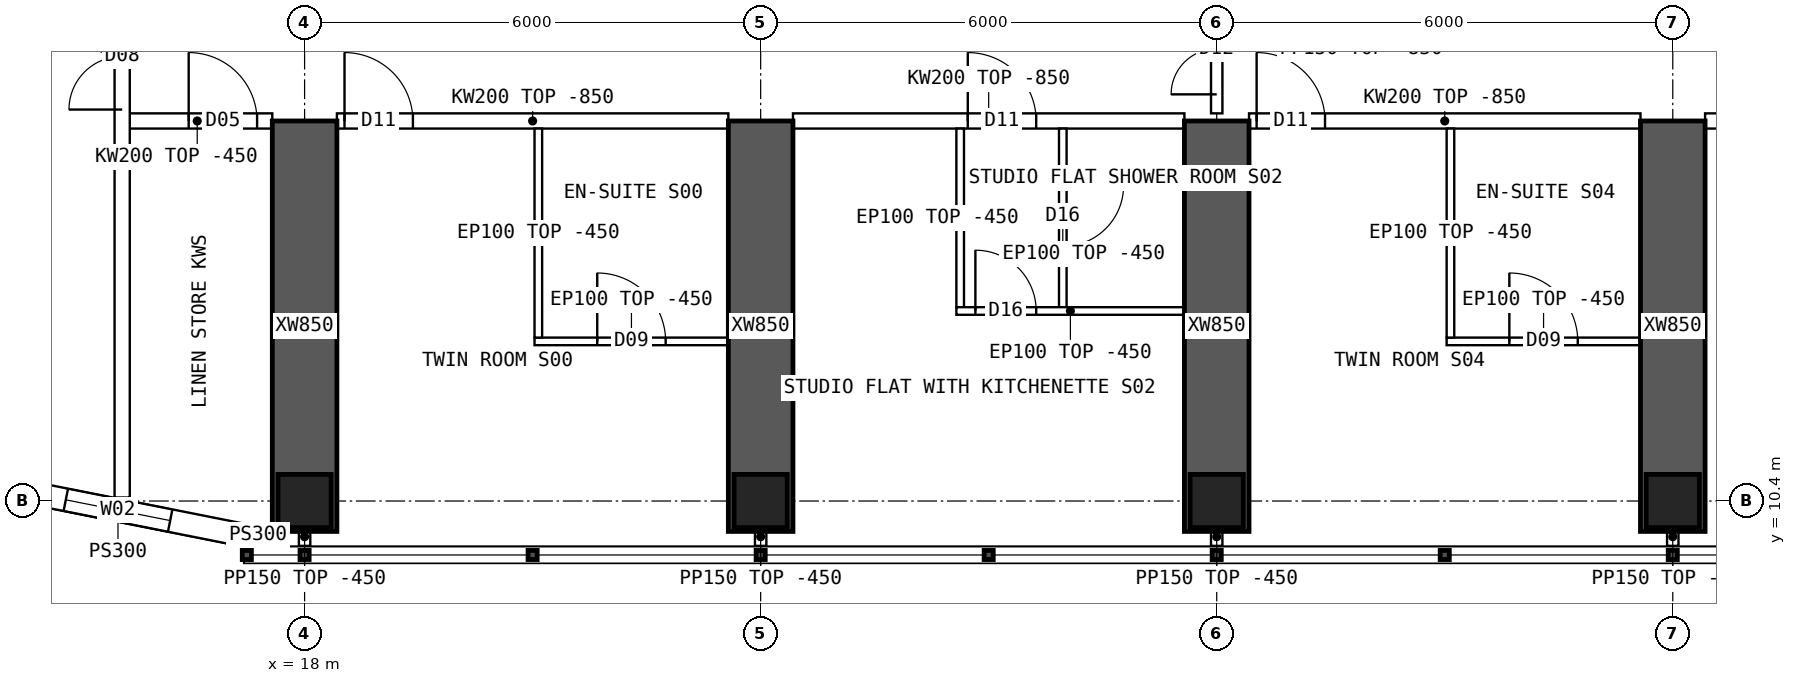
"""IFC4 building model, lengths in metres.
Left out: names, types, materials, properties, quantities, classifications, styles, units other than length and angle.
Written with IfcOpenShell. Run it as: python <this file> out.ifc"""

import sys

from ifc_helpers import new_model, si_unit, direction, frame, frame_2d, origin, origin_2d, place, context, subcontext, project, spatial, polyline, rectangle, hollow_rectangle, outline, extrude, element, fill, save


model = new_model("IFC4")
c1 = context("Model", 3, precision=1e-05, world=origin(), true_north=direction((0.0, 1.0)))
c2 = subcontext(c1, "Body", "Model", "MODEL_VIEW")
j1 = project(units=[si_unit("LENGTHUNIT", "METRE"), si_unit("PLANEANGLEUNIT", "RADIAN")], contexts=[c1])
p1 = place(None, origin())
s1 = spatial("IfcSite", under=j1, at=p1, CompositionType="ELEMENT")
p2 = place(p1, origin())
s2 = spatial("IfcBuilding", under=s1, at=p2, CompositionType="ELEMENT")
p3 = place(p2, frame((0.0, 0.0, 174.85)))
s3 = spatial("IfcBuildingStorey", under=s2, at=p3, CompositionType="ELEMENT", Elevation=174.85)
for number, where, z_axis, x_axis in (
    (1, (18.0, 10.4, 0.0), (0.0, 0.0, 1.0), (1.0, 0.0, 0.0)),
    (2, (24.0, 10.4, 0.0), (0.0, 0.0, 1.0), (1.0, 0.0, 0.0)),
    (3, (30.0, 10.4, 0.0), (0.0, 0.0, 1.0), (1.0, 0.0, 0.0)),
    (4, (36.0, 10.4, 0.0), (0.0, 0.0, 1.0), (1.0, 0.0, 0.0)),
):
    element("IfcColumn", number, at=place(p3, frame(where, z_axis=z_axis, x_axis=x_axis)), inside=s3, PredefinedType="COLUMN", context=c2, shape_type="SweptSolid", body=[
        extrude(hollow_rectangle(XDim=0.7, YDim=0.7, WallThickness=0.07, at=origin_2d()), origin(), (0.0, 0.0, 1.0), 3.75),
    ])
for number, where, z_axis, x_axis in (
    (5, (18.0, 10.0, 0.0), (0.0, 0.0, 1.0), (0.0, 1.0, 0.0)),
    (6, (24.0, 10.0, 0.0), (0.0, 0.0, 1.0), (0.0, 1.0, 0.0)),
    (7, (30.0, 10.0, 0.0), (0.0, 0.0, 1.0), (0.0, 1.0, 0.0)),
    (8, (36.0, 10.0, 0.0), (0.0, 0.0, 1.0), (0.0, 1.0, 0.0)),
):
    element("IfcWall", number, at=place(p3, frame(where, z_axis=z_axis, x_axis=x_axis)), inside=s3, PredefinedType="SHEAR", context=c2, shape_type="SweptSolid", body=[
        extrude(rectangle(XDim=5.4, YDim=0.85, at=frame_2d((2.7, 0.0))), origin(), (0.0, 0.0, 1.0), 3.75),
    ])
p4 = place(p3, frame((13.89, 10.608, 0.0), z_axis=(0.0, 0.0, 1.0), x_axis=(0.98078325777, -0.195100490205, 0.0)))
e9 = element("IfcWall", 9, at=p4, inside=s3, PredefinedType="SOLIDWALL", context=c2, shape_type="SweptSolid", body=[
    extrude(outline(polyline([(-0.03, -0.15), (3.405, -0.15), (3.345, 0.15), (0.03, 0.15), (-0.03, -0.15)])), origin(), (0.0, 0.0, 1.0), 3.3),
])
p5 = place(p4, frame((0.988, 0.0, 0.9)))
e10 = element("IfcOpeningElement", 10, at=p5, cuts=e9, PredefinedType="OPENING", context=c2, shape_type="SweptSolid", body=[
    extrude(rectangle(XDim=1.4, YDim=1.8, at=frame_2d((0.7, 0.9))), frame((0.0, 0.16, 0.0), z_axis=(0.0, -1.0, 0.0), x_axis=(1.0, 0.0, 0.0)), (0.0, 0.0, 1.0), 0.32),
])
p6 = place(p3, frame((17.2, 9.95, 0.0), z_axis=(0.0, 0.0, 1.0), x_axis=(1.0, 0.0, 0.0)))
e11 = element("IfcWall", 11, at=p6, inside=s3, PredefinedType="SOLIDWALL", context=c2, shape_type="SweptSolid", body=[
    extrude(rectangle(XDim=0.375, YDim=0.3, at=frame_2d((0.188, 0.0))), origin(), (0.0, 0.0, 1.0), 3.3),
])
p7 = place(p3, frame((15.6, 15.4, 0.0), z_axis=(0.0, 0.0, 1.0), x_axis=(1.0, 0.0, 0.0)))
e12 = element("IfcWall", 12, at=p7, inside=s3, PredefinedType="SOLIDWALL", context=c2, shape_type="SweptSolid", body=[
    extrude(rectangle(XDim=1.975, YDim=0.2, at=frame_2d((0.987, 0.0))), origin(), (0.0, 0.0, 1.0), 3.3),
])
p8 = place(p7, frame((0.875, 0.0, 0.0)))
e13 = element("IfcOpeningElement", 13, at=p8, cuts=e12, PredefinedType="OPENING", context=c2, shape_type="SweptSolid", body=[
    extrude(rectangle(XDim=0.9, YDim=2.1, at=frame_2d((0.45, 1.05))), frame((0.0, 0.11, 0.0), z_axis=(0.0, -1.0, 0.0), x_axis=(1.0, 0.0, 0.0)), (0.0, 0.0, 1.0), 0.22),
])
p9 = place(p3, frame((18.425, 15.4, 0.0), z_axis=(0.0, 0.0, 1.0), x_axis=(1.0, 0.0, 0.0)))
e14 = element("IfcWall", 14, at=p9, inside=s3, PredefinedType="SOLIDWALL", context=c2, shape_type="SweptSolid", body=[
    extrude(outline(polyline([(0.0, 0.0), (5.15, 0.0), (5.15, 2.9), (0.0, 2.9), (0.0, 0.0)])), frame((0.0, 0.1, 0.0), z_axis=(0.0, -1.0, 0.0), x_axis=(1.0, 0.0, 0.0)), (0.0, 0.0, 1.0), 0.2),
])
p10 = place(p9, frame((0.1, 0.0, 0.0)))
e15 = element("IfcOpeningElement", 15, at=p10, cuts=e14, PredefinedType="OPENING", context=c2, shape_type="SweptSolid", body=[
    extrude(rectangle(XDim=0.9, YDim=2.1, at=frame_2d((0.45, 1.05))), frame((0.0, 0.11, 0.0), z_axis=(0.0, -1.0, 0.0), x_axis=(1.0, 0.0, 0.0)), (0.0, 0.0, 1.0), 0.22),
])
p11 = place(p3, frame((24.425, 15.4, 0.0), z_axis=(0.0, 0.0, 1.0), x_axis=(1.0, 0.0, 0.0)))
e16 = element("IfcWall", 16, at=p11, inside=s3, PredefinedType="SOLIDWALL", context=c2, shape_type="SweptSolid", body=[
    extrude(outline(polyline([(0.0, 0.0), (5.15, 0.0), (5.15, 2.9), (0.0, 2.9), (0.0, 0.0)])), frame((0.0, 0.1, 0.0), z_axis=(0.0, -1.0, 0.0), x_axis=(1.0, 0.0, 0.0)), (0.0, 0.0, 1.0), 0.2),
])
p12 = place(p11, frame((2.3, 0.0, 0.0)))
e17 = element("IfcOpeningElement", 17, at=p12, cuts=e16, PredefinedType="OPENING", context=c2, shape_type="SweptSolid", body=[
    extrude(rectangle(XDim=0.9, YDim=2.1, at=frame_2d((0.45, 1.05))), frame((0.0, 0.11, 0.0), z_axis=(0.0, -1.0, 0.0), x_axis=(1.0, 0.0, 0.0)), (0.0, 0.0, 1.0), 0.22),
])
p13 = place(p3, frame((30.425, 15.4, 0.0), z_axis=(0.0, 0.0, 1.0), x_axis=(1.0, 0.0, 0.0)))
e18 = element("IfcWall", 18, at=p13, inside=s3, PredefinedType="SOLIDWALL", context=c2, shape_type="SweptSolid", body=[
    extrude(outline(polyline([(0.0, 0.0), (5.15, 0.0), (5.15, 2.9), (0.0, 2.9), (0.0, 0.0)])), frame((0.0, 0.1, 0.0), z_axis=(0.0, -1.0, 0.0), x_axis=(1.0, 0.0, 0.0)), (0.0, 0.0, 1.0), 0.2),
])
p14 = place(p13, frame((0.1, 0.0, 0.0)))
e19 = element("IfcOpeningElement", 19, at=p14, cuts=e18, PredefinedType="OPENING", context=c2, shape_type="SweptSolid", body=[
    extrude(rectangle(XDim=0.9, YDim=2.1, at=frame_2d((0.45, 1.05))), frame((0.0, 0.11, 0.0), z_axis=(0.0, -1.0, 0.0), x_axis=(1.0, 0.0, 0.0)), (0.0, 0.0, 1.0), 0.22),
])
p15 = place(p3, frame((36.425, 15.4, 0.0), z_axis=(0.0, 0.0, 1.0), x_axis=(1.0, 0.0, 0.0)))
e20 = element("IfcWall", 20, at=p15, inside=s3, PredefinedType="SOLIDWALL", context=c2, shape_type="SweptSolid", body=[
    extrude(outline(polyline([(0.0, 0.0), (5.15, 0.0), (5.15, 2.9), (0.0, 2.9), (0.0, 0.0)])), frame((0.0, 0.1, 0.0), z_axis=(0.0, -1.0, 0.0), x_axis=(1.0, 0.0, 0.0)), (0.0, 0.0, 1.0), 0.2),
])
p16 = place(p15, frame((0.3, 0.0, 0.0)))
e21 = element("IfcOpeningElement", 21, at=p16, cuts=e20, PredefinedType="OPENING", context=c2, shape_type="SweptSolid", body=[
    extrude(rectangle(XDim=1.0, YDim=2.1, at=frame_2d((0.5, 1.05))), frame((0.0, 0.11, 0.0), z_axis=(0.0, -1.0, 0.0), x_axis=(1.0, 0.0, 0.0)), (0.0, 0.0, 1.0), 0.22),
])
p17 = place(p3, frame((23.575, 12.5, 0.0), z_axis=(0.0, 0.0, 1.0), x_axis=(-1.0, 0.0, 0.0)))
e22 = element("IfcWall", 22, at=p17, inside=s3, PredefinedType="PARTITIONING", context=c2, shape_type="SweptSolid", body=[
    extrude(rectangle(XDim=2.55, YDim=0.1, at=frame_2d((1.275, 0.0))), origin(), (0.0, 0.0, 1.0), 3.3),
])
p18 = place(p17, frame((0.825, 0.0, 0.0)))
e23 = element("IfcOpeningElement", 23, at=p18, cuts=e22, PredefinedType="OPENING", context=c2, shape_type="SweptSolid", body=[
    extrude(rectangle(XDim=0.9, YDim=2.1, at=frame_2d((0.45, 1.05))), frame((0.0, 0.06, 0.0), z_axis=(0.0, -1.0, 0.0), x_axis=(1.0, 0.0, 0.0)), (0.0, 0.0, 1.0), 0.12),
])
p19 = place(p3, frame((21.075, 12.55, 0.0), z_axis=(0.0, 0.0, 1.0), x_axis=(0.0, 1.0, 0.0)))
e24 = element("IfcWall", 24, at=p19, inside=s3, PredefinedType="PARTITIONING", context=c2, shape_type="SweptSolid", body=[
    extrude(outline(polyline([(0.0, 0.0), (2.75, 0.0), (2.75, 2.9), (2.702, 2.9), (2.7, 3.3), (0.0, 3.3), (0.0, 0.0)])), frame((0.0, 0.05, 0.0), z_axis=(0.0, -1.0, 0.0), x_axis=(1.0, 0.0, 0.0)), (0.0, 0.0, 1.0), 0.1),
])
p20 = place(p3, frame((29.575, 12.9, 0.0), z_axis=(0.0, 0.0, 1.0), x_axis=(-1.0, 0.0, 0.0)))
e25 = element("IfcWall", 25, at=p20, inside=s3, PredefinedType="PARTITIONING", context=c2, shape_type="SweptSolid", body=[
    extrude(rectangle(XDim=3.0, YDim=0.1, at=frame_2d((1.5, 0.0))), origin(), (0.0, 0.0, 1.0), 3.3),
])
p21 = place(p20, frame((1.95, 0.0, 0.0)))
e26 = element("IfcOpeningElement", 26, at=p21, cuts=e25, PredefinedType="OPENING", context=c2, shape_type="SweptSolid", body=[
    extrude(rectangle(XDim=0.8, YDim=2.1, at=frame_2d((0.4, 1.05))), frame((0.0, 0.06, 0.0), z_axis=(0.0, -1.0, 0.0), x_axis=(1.0, 0.0, 0.0)), (0.0, 0.0, 1.0), 0.12),
])
p22 = place(p3, frame((26.625, 12.95, 0.0), z_axis=(0.0, 0.0, 1.0), x_axis=(0.0, 1.0, 0.0)))
e27 = element("IfcWall", 27, at=p22, inside=s3, PredefinedType="PARTITIONING", context=c2, shape_type="SweptSolid", body=[
    extrude(outline(polyline([(0.0, 0.0), (2.35, 0.0), (2.35, 2.9), (2.302, 2.9), (2.3, 3.3), (0.0, 3.3), (0.0, 0.0)])), frame((0.0, 0.05, 0.0), z_axis=(0.0, -1.0, 0.0), x_axis=(1.0, 0.0, 0.0)), (0.0, 0.0, 1.0), 0.1),
])
p23 = place(p3, frame((27.975, 12.95, 0.0), z_axis=(0.0, 0.0, 1.0), x_axis=(0.0, 1.0, 0.0)))
e28 = element("IfcWall", 28, at=p23, inside=s3, PredefinedType="PARTITIONING", context=c2, shape_type="SweptSolid", body=[
    extrude(outline(polyline([(0.0, 0.0), (2.35, 0.0), (2.35, 2.9), (2.302, 2.9), (2.3, 3.3), (0.0, 3.3), (0.0, 0.0)])), frame((0.0, 0.05, 0.0), z_axis=(0.0, -1.0, 0.0), x_axis=(1.0, 0.0, 0.0)), (0.0, 0.0, 1.0), 0.1),
])
p24 = place(p23, frame((0.8, 0.0, 0.0)))
e29 = element("IfcOpeningElement", 29, at=p24, cuts=e28, PredefinedType="OPENING", context=c2, shape_type="SweptSolid", body=[
    extrude(rectangle(XDim=0.8, YDim=2.1, at=frame_2d((0.4, 1.05))), frame((0.0, 0.06, 0.0), z_axis=(0.0, -1.0, 0.0), x_axis=(1.0, 0.0, 0.0)), (0.0, 0.0, 1.0), 0.12),
])
p25 = place(p3, frame((35.575, 12.5, 0.0), z_axis=(0.0, 0.0, 1.0), x_axis=(-1.0, 0.0, 0.0)))
e30 = element("IfcWall", 30, at=p25, inside=s3, PredefinedType="PARTITIONING", context=c2, shape_type="SweptSolid", body=[
    extrude(rectangle(XDim=2.55, YDim=0.1, at=frame_2d((1.275, 0.0))), origin(), (0.0, 0.0, 1.0), 3.3),
])
p26 = place(p25, frame((0.825, 0.0, 0.0)))
e31 = element("IfcOpeningElement", 31, at=p26, cuts=e30, PredefinedType="OPENING", context=c2, shape_type="SweptSolid", body=[
    extrude(rectangle(XDim=0.9, YDim=2.1, at=frame_2d((0.45, 1.05))), frame((0.0, 0.06, 0.0), z_axis=(0.0, -1.0, 0.0), x_axis=(1.0, 0.0, 0.0)), (0.0, 0.0, 1.0), 0.12),
])
p27 = place(p3, frame((33.075, 12.55, 0.0), z_axis=(0.0, 0.0, 1.0), x_axis=(0.0, 1.0, 0.0)))
e32 = element("IfcWall", 32, at=p27, inside=s3, PredefinedType="PARTITIONING", context=c2, shape_type="SweptSolid", body=[
    extrude(outline(polyline([(0.0, 0.0), (2.75, 0.0), (2.75, 2.9), (2.702, 2.9), (2.7, 3.3), (0.0, 3.3), (0.0, 0.0)])), frame((0.0, 0.05, 0.0), z_axis=(0.0, -1.0, 0.0), x_axis=(1.0, 0.0, 0.0)), (0.0, 0.0, 1.0), 0.1),
])
p28 = place(p3, frame((30.0, 15.5, 0.0), z_axis=(0.0, 0.0, 1.0), x_axis=(0.0, 1.0, 0.0)))
e33 = element("IfcWall", 33, at=p28, inside=s3, PredefinedType="PARTITIONING", context=c2, shape_type="SweptSolid", body=[
    extrude(outline(polyline([(0.0, 0.0), (1.7, 0.0), (1.7, 2.9), (0.0, 2.9), (0.0, 0.0)])), frame((0.0, 0.075, 0.0), z_axis=(0.0, -1.0, 0.0), x_axis=(1.0, 0.0, 0.0)), (0.0, 0.0, 1.0), 0.15),
])
p29 = place(p28, frame((0.25, 0.0, 0.0)))
e34 = element("IfcOpeningElement", 34, at=p29, cuts=e33, PredefinedType="OPENING", context=c2, shape_type="SweptSolid", body=[
    extrude(rectangle(XDim=1.2, YDim=2.1, at=frame_2d((0.6, 1.05))), frame((0.0, 0.085, 0.0), z_axis=(0.0, -1.0, 0.0), x_axis=(1.0, 0.0, 0.0)), (0.0, 0.0, 1.0), 0.17),
])
p30 = place(p3, frame((15.6, 10.446, 0.0), z_axis=(0.0, 0.0, 1.0), x_axis=(0.0, 1.0, 0.0)))
e35 = element("IfcWall", 35, at=p30, inside=s3, PredefinedType="SOLIDWALL", context=c2, shape_type="SweptSolid", body=[
    extrude(rectangle(XDim=43.107, YDim=0.2, at=frame_2d((21.554, 0.0))), origin(), (0.0, 0.0, 1.0), 3.3),
])
p31 = place(p30, frame((13.914, 0.0, 0.0)))
e36 = element("IfcOpeningElement", 36, at=p31, cuts=e35, PredefinedType="OPENING", context=c2, shape_type="SweptSolid", body=[
    extrude(rectangle(XDim=1.2, YDim=2.1, at=frame_2d((0.6, 1.05))), frame((0.0, 0.11, 0.0), z_axis=(0.0, -1.0, 0.0), x_axis=(1.0, 0.0, 0.0)), (0.0, 0.0, 1.0), 0.22),
])
p32 = place(p30, frame((27.994, 0.0, 0.0)))
e37 = element("IfcOpeningElement", 37, at=p32, cuts=e35, PredefinedType="OPENING", context=c2, shape_type="SweptSolid", body=[
    extrude(rectangle(XDim=1.2, YDim=2.1, at=frame_2d((0.6, 1.05))), frame((0.0, 0.11, 0.0), z_axis=(0.0, -1.0, 0.0), x_axis=(1.0, 0.0, 0.0)), (0.0, 0.0, 1.0), 0.22),
])
p33 = place(p30, frame((5.104, 0.0, 0.0)))
e38 = element("IfcOpeningElement", 38, at=p33, cuts=e35, PredefinedType="OPENING", context=c2, shape_type="SweptSolid", body=[
    extrude(rectangle(XDim=1.4, YDim=2.1, at=frame_2d((0.7, 1.05))), frame((0.0, 0.11, 0.0), z_axis=(0.0, -1.0, 0.0), x_axis=(1.0, 0.0, 0.0)), (0.0, 0.0, 1.0), 0.22),
])
p34 = place(p30, frame((36.504, 0.0, 0.0)))
e39 = element("IfcOpeningElement", 39, at=p34, cuts=e35, PredefinedType="OPENING", context=c2, shape_type="SweptSolid", body=[
    extrude(rectangle(XDim=1.4, YDim=2.1, at=frame_2d((0.7, 1.05))), frame((0.0, 0.11, 0.0), z_axis=(0.0, -1.0, 0.0), x_axis=(1.0, 0.0, 0.0)), (0.0, 0.0, 1.0), 0.22),
])
for number, where, z_axis, x_axis in (
    (40, (18.0, 10.05, 0.0), (0.0, 0.0, 1.0), (0.0, -1.0, 0.0)),
    (41, (24.0, 10.05, 0.0), (0.0, 0.0, 1.0), (0.0, -1.0, 0.0)),
    (42, (30.0, 10.05, 0.0), (0.0, 0.0, 1.0), (0.0, -1.0, 0.0)),
    (43, (36.0, 10.05, 0.0), (0.0, 0.0, 1.0), (0.0, -1.0, 0.0)),
):
    element("IfcWall", number, at=place(p3, frame(where, z_axis=z_axis, x_axis=x_axis)), inside=s3, PredefinedType="PARTITIONING", context=c2, shape_type="SweptSolid", body=[
        extrude(rectangle(XDim=0.24, YDim=0.15, at=frame_2d((0.12, 0.0))), origin(), (0.0, 0.0, 1.0), 3.3),
    ])
p35 = place(p5, origin())
e44 = element("IfcWindow", 44, at=p35, inside=s3, PartitioningType="SINGLE_PANEL", PredefinedType="WINDOW", context=c2, shape_type="SweptSolid", body=[
    extrude(rectangle(XDim=1.4, YDim=1.8, at=frame_2d((0.7, 0.9))), frame((0.0, 0.03, 0.0), z_axis=(0.0, -1.0, 0.0), x_axis=(1.0, 0.0, 0.0)), (0.0, 0.0, 1.0), 0.06),
])
fill(e10, e44)
p36 = place(p18, origin())
e45 = element("IfcDoor", 45, at=p36, inside=s3, OperationType="SINGLE_SWING_RIGHT", PredefinedType="DOOR", context=c2, shape_type="SweptSolid", body=[
    extrude(rectangle(XDim=0.9, YDim=2.1, at=frame_2d((0.45, 1.05))), frame((0.0, 0.025, 0.0), z_axis=(0.0, -1.0, 0.0), x_axis=(1.0, 0.0, 0.0)), (0.0, 0.0, 1.0), 0.05),
])
fill(e23, e45)
p37 = place(p10, origin())
e46 = element("IfcDoor", 46, at=p37, inside=s3, OperationType="SINGLE_SWING_LEFT", PredefinedType="DOOR", context=c2, shape_type="SweptSolid", body=[
    extrude(rectangle(XDim=0.9, YDim=2.1, at=frame_2d((0.45, 1.05))), frame((0.0, 0.025, 0.0), z_axis=(0.0, -1.0, 0.0), x_axis=(1.0, 0.0, 0.0)), (0.0, 0.0, 1.0), 0.05),
])
fill(e15, e46)
p38 = place(p21, origin())
e47 = element("IfcDoor", 47, at=p38, inside=s3, OperationType="SINGLE_SWING_RIGHT", PredefinedType="DOOR", context=c2, shape_type="SweptSolid", body=[
    extrude(rectangle(XDim=0.8, YDim=2.1, at=frame_2d((0.4, 1.05))), frame((0.0, 0.025, 0.0), z_axis=(0.0, -1.0, 0.0), x_axis=(1.0, 0.0, 0.0)), (0.0, 0.0, 1.0), 0.05),
])
fill(e26, e47)
p39 = place(p24, origin())
e48 = element("IfcDoor", 48, at=p39, inside=s3, OperationType="SINGLE_SWING_RIGHT", PredefinedType="DOOR", context=c2, shape_type="SweptSolid", body=[
    extrude(rectangle(XDim=0.8, YDim=2.1, at=frame_2d((0.4, 1.05))), frame((0.0, 0.025, 0.0), z_axis=(0.0, -1.0, 0.0), x_axis=(1.0, 0.0, 0.0)), (0.0, 0.0, 1.0), 0.05),
])
fill(e29, e48)
p40 = place(p12, origin())
e49 = element("IfcDoor", 49, at=p40, inside=s3, OperationType="SINGLE_SWING_LEFT", PredefinedType="DOOR", context=c2, shape_type="SweptSolid", body=[
    extrude(rectangle(XDim=0.9, YDim=2.1, at=frame_2d((0.45, 1.05))), frame((0.0, 0.025, 0.0), z_axis=(0.0, -1.0, 0.0), x_axis=(1.0, 0.0, 0.0)), (0.0, 0.0, 1.0), 0.05),
])
fill(e17, e49)
p41 = place(p26, origin())
e50 = element("IfcDoor", 50, at=p41, inside=s3, OperationType="SINGLE_SWING_RIGHT", PredefinedType="DOOR", context=c2, shape_type="SweptSolid", body=[
    extrude(rectangle(XDim=0.9, YDim=2.1, at=frame_2d((0.45, 1.05))), frame((0.0, 0.025, 0.0), z_axis=(0.0, -1.0, 0.0), x_axis=(1.0, 0.0, 0.0)), (0.0, 0.0, 1.0), 0.05),
])
fill(e31, e50)
p42 = place(p14, origin())
e51 = element("IfcDoor", 51, at=p42, inside=s3, OperationType="SINGLE_SWING_LEFT", PredefinedType="DOOR", context=c2, shape_type="SweptSolid", body=[
    extrude(rectangle(XDim=0.9, YDim=2.1, at=frame_2d((0.45, 1.05))), frame((0.0, 0.025, 0.0), z_axis=(0.0, -1.0, 0.0), x_axis=(1.0, 0.0, 0.0)), (0.0, 0.0, 1.0), 0.05),
])
fill(e19, e51)
p43 = place(p29, origin())
e52 = element("IfcDoor", 52, at=p43, inside=s3, OperationType="DOUBLE_DOOR_SINGLE_SWING", PredefinedType="DOOR", context=c2, shape_type="SweptSolid", body=[
    extrude(rectangle(XDim=1.2, YDim=2.1, at=frame_2d((0.6, 1.05))), frame((0.0, 0.025, 0.0), z_axis=(0.0, -1.0, 0.0), x_axis=(1.0, 0.0, 0.0)), (0.0, 0.0, 1.0), 0.05),
])
fill(e34, e52)
p44 = place(p33, origin())
e53 = element("IfcDoor", 53, at=p44, inside=s3, OperationType="DOUBLE_DOOR_SINGLE_SWING", PredefinedType="DOOR", context=c2, shape_type="SweptSolid", body=[
    extrude(rectangle(XDim=1.4, YDim=2.1, at=frame_2d((0.7, 1.05))), frame((0.0, 0.025, 0.0), z_axis=(0.0, -1.0, 0.0), x_axis=(1.0, 0.0, 0.0)), (0.0, 0.0, 1.0), 0.05),
])
fill(e38, e53)
p45 = place(p8, origin())
e54 = element("IfcDoor", 54, at=p45, inside=s3, OperationType="SINGLE_SWING_LEFT", PredefinedType="DOOR", context=c2, shape_type="SweptSolid", body=[
    extrude(rectangle(XDim=0.9, YDim=2.1, at=frame_2d((0.45, 1.05))), frame((0.0, 0.025, 0.0), z_axis=(0.0, -1.0, 0.0), x_axis=(1.0, 0.0, 0.0)), (0.0, 0.0, 1.0), 0.05),
])
fill(e13, e54)
save(model, sys.argv[1])
